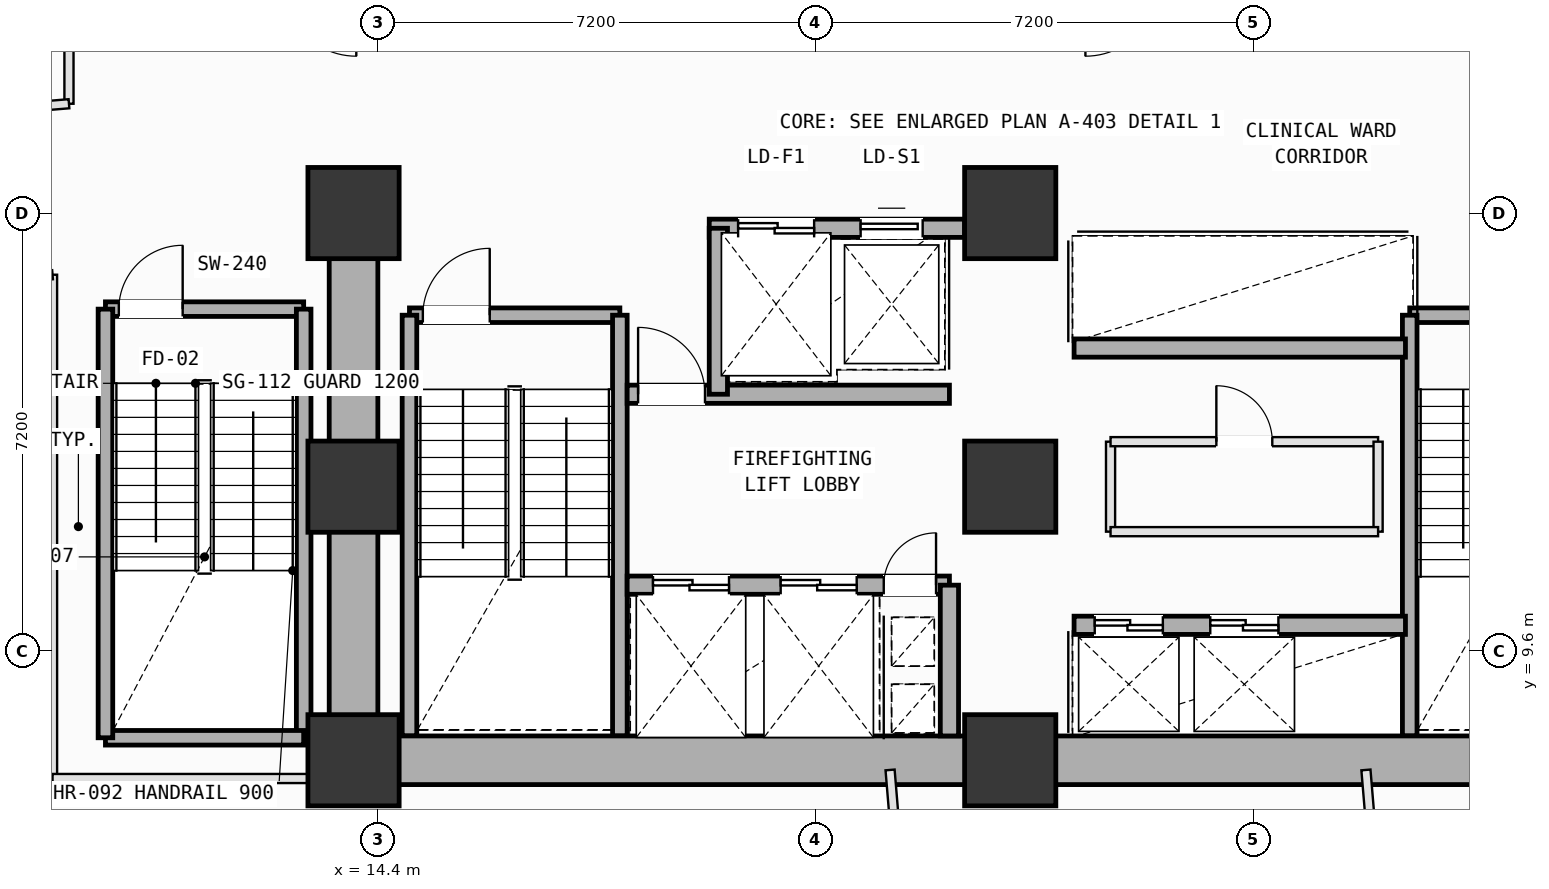
"""IFC4 building model, lengths in metres.
Left out: names, types, materials, properties, quantities, classifications, styles, units other than length and angle.
Written with IfcOpenShell. Run it as: python <this file> out.ifc"""

import sys

from ifc_helpers import new_model, si_unit, direction, frame, frame_2d, origin, origin_2d, place, context, subcontext, project, spatial, rectangle, extrude, element, fill, save


model = new_model("IFC4")
c1 = context("Model", 3, precision=1e-05, world=origin(), true_north=direction((0.0, 1.0)))
c2 = subcontext(c1, "Body", "Model", "MODEL_VIEW")
j1 = project(units=[si_unit("LENGTHUNIT", "METRE"), si_unit("PLANEANGLEUNIT", "RADIAN")], contexts=[c1])
p1 = place(None, origin())
s1 = spatial("IfcSite", under=j1, at=p1, CompositionType="ELEMENT")
p2 = place(p1, origin())
s2 = spatial("IfcBuilding", under=s1, at=p2, CompositionType="ELEMENT")
p3 = place(p2, frame((0.0, 0.0, 43.0)))
s3 = spatial("IfcBuildingStorey", under=s2, at=p3, CompositionType="ELEMENT", Elevation=43.0)
for number, where, z_axis, x_axis in (
    (1, (14.0, 7.8, 0.0), (0.0, 0.0, 1.0), (1.0, 0.0, 0.0)),
    (2, (14.0, 12.3, 0.0), (0.0, 0.0, 1.0), (1.0, 0.0, 0.0)),
    (3, (14.0, 16.8, 0.0), (0.0, 0.0, 1.0), (1.0, 0.0, 0.0)),
    (4, (24.8, 7.8, 0.0), (0.0, 0.0, 1.0), (1.0, 0.0, 0.0)),
    (5, (24.8, 12.3, 0.0), (0.0, 0.0, 1.0), (1.0, 0.0, 0.0)),
    (6, (24.8, 16.8, 0.0), (0.0, 0.0, 1.0), (1.0, 0.0, 0.0)),
):
    element("IfcColumn", number, at=place(p3, frame(where, z_axis=z_axis, x_axis=x_axis)), inside=s3, PredefinedType="COLUMN", context=c2, shape_type="SweptSolid", body=[
        extrude(rectangle(XDim=1.5, YDim=1.5, at=origin_2d()), origin(), (0.0, 0.0, 1.0), 4.0),
    ])
p4 = place(p3, frame((14.92, 15.12, 0.0), z_axis=(0.0, 0.0, 1.0), x_axis=(1.0, 0.0, 0.0)))
e7 = element("IfcWall", 7, at=p4, inside=s3, PredefinedType="SOLIDWALL", context=c2, shape_type="SweptSolid", body=[
    extrude(rectangle(XDim=3.46, YDim=0.24, at=frame_2d((1.73, 0.0))), origin(), (0.0, 0.0, 1.0), 3.78),
])
p5 = place(p4, frame((0.22, 0.0, 0.0)))
e8 = element("IfcOpeningElement", 8, at=p5, cuts=e7, PredefinedType="OPENING", context=c2, shape_type="SweptSolid", body=[
    extrude(rectangle(XDim=1.1, YDim=2.15, at=frame_2d((0.55, 1.075))), frame((0.0, 0.13, 0.0), z_axis=(0.0, -1.0, 0.0), x_axis=(1.0, 0.0, 0.0)), (0.0, 0.0, 1.0), 0.26),
])
for number, where, z_axis, x_axis in (
    (9, (18.38, 15.12, 0.0), (0.0, 0.0, 1.0), (0.0, -1.0, 0.0)),
    (10, (14.92, 8.2, 0.0), (0.0, 0.0, 1.0), (0.0, 1.0, 0.0)),
):
    element("IfcWall", number, at=place(p3, frame(where, z_axis=z_axis, x_axis=x_axis)), inside=s3, PredefinedType="SOLIDWALL", context=c2, shape_type="SweptSolid", body=[
        extrude(rectangle(XDim=6.92, YDim=0.24, at=frame_2d((3.46, 0.0))), origin(), (0.0, 0.0, 1.0), 3.78),
    ])
p6 = place(p3, frame((31.37, 15.12, 0.0), z_axis=(0.0, 0.0, 1.0), x_axis=(1.0, 0.0, 0.0)))
e11 = element("IfcWall", 11, at=p6, inside=s3, PredefinedType="SOLIDWALL", context=c2, shape_type="SweptSolid", body=[
    extrude(rectangle(XDim=3.46, YDim=0.24, at=frame_2d((1.73, 0.0))), origin(), (0.0, 0.0, 1.0), 3.78),
])
p7 = place(p6, frame((2.14, 0.0, 0.0)))
e12 = element("IfcOpeningElement", 12, at=p7, cuts=e11, PredefinedType="OPENING", context=c2, shape_type="SweptSolid", body=[
    extrude(rectangle(XDim=1.1, YDim=2.15, at=frame_2d((0.55, 1.075))), frame((0.0, 0.13, 0.0), z_axis=(0.0, -1.0, 0.0), x_axis=(1.0, 0.0, 0.0)), (0.0, 0.0, 1.0), 0.26),
])
p8 = place(p3, frame((31.37, 8.2, 0.0), z_axis=(0.0, 0.0, 1.0), x_axis=(0.0, 1.0, 0.0)))
e13 = element("IfcWall", 13, at=p8, inside=s3, PredefinedType="SOLIDWALL", context=c2, shape_type="SweptSolid", body=[
    extrude(rectangle(XDim=6.92, YDim=0.24, at=frame_2d((3.46, 0.0))), origin(), (0.0, 0.0, 1.0), 3.78),
])
p9 = place(p3, frame((9.92, 15.22, 0.0), z_axis=(0.0, 0.0, 1.0), x_axis=(1.0, 0.0, 0.0)))
e14 = element("IfcWall", 14, at=p9, inside=s3, PredefinedType="SOLIDWALL", context=c2, shape_type="SweptSolid", body=[
    extrude(rectangle(XDim=3.26, YDim=0.24, at=frame_2d((1.63, 0.0))), origin(), (0.0, 0.0, 1.0), 3.78),
])
p10 = place(p9, frame((0.22, 0.0, 0.0)))
e15 = element("IfcOpeningElement", 15, at=p10, cuts=e14, PredefinedType="OPENING", context=c2, shape_type="SweptSolid", body=[
    extrude(rectangle(XDim=1.05, YDim=2.15, at=frame_2d((0.525, 1.075))), frame((0.0, 0.13, 0.0), z_axis=(0.0, -1.0, 0.0), x_axis=(1.0, 0.0, 0.0)), (0.0, 0.0, 1.0), 0.26),
])
p11 = place(p3, frame((13.18, 15.22, 0.0), z_axis=(0.0, 0.0, 1.0), x_axis=(0.0, -1.0, 0.0)))
e16 = element("IfcWall", 16, at=p11, inside=s3, PredefinedType="SOLIDWALL", context=c2, shape_type="SweptSolid", body=[
    extrude(rectangle(XDim=7.05, YDim=0.24, at=frame_2d((3.525, 0.0))), origin(), (0.0, 0.0, 1.0), 3.78),
])
p12 = place(p3, frame((13.18, 8.17, 0.0), z_axis=(0.0, 0.0, 1.0), x_axis=(-1.0, 0.0, 0.0)))
e17 = element("IfcWall", 17, at=p12, inside=s3, PredefinedType="SOLIDWALL", context=c2, shape_type="SweptSolid", body=[
    extrude(rectangle(XDim=3.26, YDim=0.24, at=frame_2d((1.63, 0.0))), origin(), (0.0, 0.0, 1.0), 3.78),
])
p13 = place(p3, frame((9.92, 8.17, 0.0), z_axis=(0.0, 0.0, 1.0), x_axis=(0.0, 1.0, 0.0)))
e18 = element("IfcWall", 18, at=p13, inside=s3, PredefinedType="SOLIDWALL", context=c2, shape_type="SweptSolid", body=[
    extrude(rectangle(XDim=7.05, YDim=0.24, at=frame_2d((3.525, 0.0))), origin(), (0.0, 0.0, 1.0), 3.78),
])
for number, where, z_axis, x_axis in (
    (19, (14.0, 7.8, 0.0), (0.0, 0.0, 1.0), (1.0, 0.0, 0.0)),
    (20, (24.8, 7.8, 0.0), (0.0, 0.0, 1.0), (1.0, 0.0, 0.0)),
):
    element("IfcWall", number, at=place(p3, frame(where, z_axis=z_axis, x_axis=x_axis)), inside=s3, PredefinedType="SHEAR", context=c2, shape_type="SweptSolid", body=[
        extrude(rectangle(XDim=10.8, YDim=0.8, at=frame_2d((5.4, 0.0))), origin(), (0.0, 0.0, 1.0), 3.78),
    ])
p14 = place(p3, frame((14.0, 16.8, 0.0), z_axis=(0.0, 0.0, 1.0), x_axis=(0.0, -1.0, 0.0)))
e21 = element("IfcWall", 21, at=p14, inside=s3, PredefinedType="SHEAR", context=c2, shape_type="SweptSolid", body=[
    extrude(rectangle(XDim=9.0, YDim=0.8, at=frame_2d((4.5, 0.0))), origin(), (0.0, 0.0, 1.0), 3.78),
])
p15 = place(p3, frame((19.85, 16.55, 0.0), z_axis=(0.0, 0.0, 1.0), x_axis=(1.0, 0.0, 0.0)))
e22 = element("IfcWall", 22, at=p15, inside=s3, PredefinedType="SOLIDWALL", context=c2, shape_type="SweptSolid", body=[
    extrude(rectangle(XDim=4.2, YDim=0.3, at=frame_2d((2.1, 0.0))), origin(), (0.0, 0.0, 1.0), 3.78),
])
p16 = place(p15, frame((0.475, 0.0, 0.0)))
e23 = element("IfcOpeningElement", 23, at=p16, cuts=e22, PredefinedType="OPENING", context=c2, shape_type="SweptSolid", body=[
    extrude(rectangle(XDim=1.25, YDim=2.18, at=frame_2d((0.625, 1.09))), frame((0.0, 0.16, 0.0), z_axis=(0.0, -1.0, 0.0), x_axis=(1.0, 0.0, 0.0)), (0.0, 0.0, 1.0), 0.32),
])
p17 = place(p15, frame((2.49, 0.0, 0.0)))
e24 = element("IfcOpeningElement", 24, at=p17, cuts=e22, PredefinedType="OPENING", context=c2, shape_type="SweptSolid", body=[
    extrude(rectangle(XDim=1.02, YDim=2.12, at=frame_2d((0.51, 1.06))), frame((0.0, 0.16, 0.0), z_axis=(0.0, -1.0, 0.0), x_axis=(1.0, 0.0, 0.0)), (0.0, 0.0, 1.0), 0.32),
])
p18 = place(p3, frame((18.5, 10.68, 0.0), z_axis=(0.0, 0.0, 1.0), x_axis=(1.0, 0.0, 0.0)))
e25 = element("IfcWall", 25, at=p18, inside=s3, PredefinedType="SOLIDWALL", context=c2, shape_type="SweptSolid", body=[
    extrude(rectangle(XDim=5.3, YDim=0.3, at=frame_2d((2.65, 0.0))), origin(), (0.0, 0.0, 1.0), 3.78),
])
p19 = place(p18, frame((4.22, 0.0, 0.0)))
e26 = element("IfcOpeningElement", 26, at=p19, cuts=e25, PredefinedType="OPENING", context=c2, shape_type="SweptSolid", body=[
    extrude(rectangle(XDim=0.86, YDim=2.06, at=frame_2d((0.43, 1.03))), frame((0.0, 0.16, 0.0), z_axis=(0.0, -1.0, 0.0), x_axis=(1.0, 0.0, 0.0)), (0.0, 0.0, 1.0), 0.32),
])
p20 = place(p18, frame((0.425, 0.0, 0.0)))
e27 = element("IfcOpeningElement", 27, at=p20, cuts=e25, PredefinedType="OPENING", context=c2, shape_type="SweptSolid", body=[
    extrude(rectangle(XDim=1.25, YDim=2.18, at=frame_2d((0.625, 1.09))), frame((0.0, 0.16, 0.0), z_axis=(0.0, -1.0, 0.0), x_axis=(1.0, 0.0, 0.0)), (0.0, 0.0, 1.0), 0.32),
])
p21 = place(p18, frame((2.525, 0.0, 0.0)))
e28 = element("IfcOpeningElement", 28, at=p21, cuts=e25, PredefinedType="OPENING", context=c2, shape_type="SweptSolid", body=[
    extrude(rectangle(XDim=1.25, YDim=2.18, at=frame_2d((0.625, 1.09))), frame((0.0, 0.16, 0.0), z_axis=(0.0, -1.0, 0.0), x_axis=(1.0, 0.0, 0.0)), (0.0, 0.0, 1.0), 0.32),
])
p22 = place(p3, frame((18.5, 13.82, 0.0), z_axis=(0.0, 0.0, 1.0), x_axis=(1.0, 0.0, 0.0)))
e29 = element("IfcWall", 29, at=p22, inside=s3, PredefinedType="SOLIDWALL", context=c2, shape_type="SweptSolid", body=[
    extrude(rectangle(XDim=5.3, YDim=0.3, at=frame_2d((2.65, 0.0))), origin(), (0.0, 0.0, 1.0), 3.78),
])
p23 = place(p22, frame((0.18, 0.0, 0.0)))
e30 = element("IfcOpeningElement", 30, at=p23, cuts=e29, PredefinedType="OPENING", context=c2, shape_type="SweptSolid", body=[
    extrude(rectangle(XDim=1.1, YDim=2.15, at=frame_2d((0.55, 1.075))), frame((0.0, 0.16, 0.0), z_axis=(0.0, -1.0, 0.0), x_axis=(1.0, 0.0, 0.0)), (0.0, 0.0, 1.0), 0.32),
])
p24 = place(p3, frame((23.8, 8.2, 0.0), z_axis=(0.0, 0.0, 1.0), x_axis=(0.0, 1.0, 0.0)))
e31 = element("IfcWall", 31, at=p24, inside=s3, PredefinedType="SOLIDWALL", context=c2, shape_type="SweptSolid", body=[
    extrude(rectangle(XDim=2.48, YDim=0.3, at=frame_2d((1.24, 0.0))), origin(), (0.0, 0.0, 1.0), 3.78),
])
p25 = place(p3, frame((20.0, 13.82, 0.0), z_axis=(0.0, 0.0, 1.0), x_axis=(0.0, 1.0, 0.0)))
e32 = element("IfcWall", 32, at=p25, inside=s3, PredefinedType="SOLIDWALL", context=c2, shape_type="SweptSolid", body=[
    extrude(rectangle(XDim=2.73, YDim=0.3, at=frame_2d((1.365, 0.0))), origin(), (0.0, 0.0, 1.0), 3.78),
])
p26 = place(p3, frame((25.85, 10.02, 0.0), z_axis=(0.0, 0.0, 1.0), x_axis=(1.0, 0.0, 0.0)))
e33 = element("IfcWall", 33, at=p26, inside=s3, PredefinedType="SOLIDWALL", context=c2, shape_type="SweptSolid", body=[
    extrude(rectangle(XDim=5.45, YDim=0.3, at=frame_2d((2.725, 0.0))), origin(), (0.0, 0.0, 1.0), 3.78),
])
p27 = place(p26, frame((0.34, 0.0, 0.0)))
e34 = element("IfcOpeningElement", 34, at=p27, cuts=e33, PredefinedType="OPENING", context=c2, shape_type="SweptSolid", body=[
    extrude(rectangle(XDim=1.12, YDim=2.15, at=frame_2d((0.56, 1.075))), frame((0.0, 0.16, 0.0), z_axis=(0.0, -1.0, 0.0), x_axis=(1.0, 0.0, 0.0)), (0.0, 0.0, 1.0), 0.32),
])
p28 = place(p26, frame((2.24, 0.0, 0.0)))
e35 = element("IfcOpeningElement", 35, at=p28, cuts=e33, PredefinedType="OPENING", context=c2, shape_type="SweptSolid", body=[
    extrude(rectangle(XDim=1.12, YDim=2.15, at=frame_2d((0.56, 1.075))), frame((0.0, 0.16, 0.0), z_axis=(0.0, -1.0, 0.0), x_axis=(1.0, 0.0, 0.0)), (0.0, 0.0, 1.0), 0.32),
])
p29 = place(p3, frame((25.85, 14.58, 0.0), z_axis=(0.0, 0.0, 1.0), x_axis=(1.0, 0.0, 0.0)))
e36 = element("IfcWall", 36, at=p29, inside=s3, PredefinedType="SOLIDWALL", context=c2, shape_type="SweptSolid", body=[
    extrude(rectangle(XDim=5.45, YDim=0.3, at=frame_2d((2.725, 0.0))), origin(), (0.0, 0.0, 1.0), 3.78),
])
p30 = place(p3, frame((26.45, 11.56, 0.0), z_axis=(0.0, 0.0, 1.0), x_axis=(0.0, 1.0, 0.0)))
e37 = element("IfcWall", 37, at=p30, inside=s3, PredefinedType="PARTITIONING", context=c2, shape_type="SweptSolid", body=[
    extrude(rectangle(XDim=1.48, YDim=0.15, at=frame_2d((0.74, 0.0))), origin(), (0.0, 0.0, 1.0), 3.78),
])
p31 = place(p3, frame((26.45, 13.04, 0.0), z_axis=(0.0, 0.0, 1.0), x_axis=(1.0, 0.0, 0.0)))
e38 = element("IfcWall", 38, at=p31, inside=s3, PredefinedType="PARTITIONING", context=c2, shape_type="SweptSolid", body=[
    extrude(rectangle(XDim=4.4, YDim=0.15, at=frame_2d((2.2, 0.0))), origin(), (0.0, 0.0, 1.0), 3.78),
])
p32 = place(p31, frame((1.74, 0.0, 0.0)))
e39 = element("IfcOpeningElement", 39, at=p32, cuts=e38, PredefinedType="OPENING", context=c2, shape_type="SweptSolid", body=[
    extrude(rectangle(XDim=0.92, YDim=2.1, at=frame_2d((0.46, 1.05))), frame((0.0, 0.085, 0.0), z_axis=(0.0, -1.0, 0.0), x_axis=(1.0, 0.0, 0.0)), (0.0, 0.0, 1.0), 0.17),
])
p33 = place(p3, frame((30.85, 13.04, 0.0), z_axis=(0.0, 0.0, 1.0), x_axis=(0.0, -1.0, 0.0)))
e40 = element("IfcWall", 40, at=p33, inside=s3, PredefinedType="PARTITIONING", context=c2, shape_type="SweptSolid", body=[
    extrude(rectangle(XDim=1.48, YDim=0.15, at=frame_2d((0.74, 0.0))), origin(), (0.0, 0.0, 1.0), 3.78),
])
p34 = place(p3, frame((30.85, 11.56, 0.0), z_axis=(0.0, 0.0, 1.0), x_axis=(-1.0, 0.0, 0.0)))
e41 = element("IfcWall", 41, at=p34, inside=s3, PredefinedType="PARTITIONING", context=c2, shape_type="SweptSolid", body=[
    extrude(rectangle(XDim=4.4, YDim=0.15, at=frame_2d((2.2, 0.0))), origin(), (0.0, 0.0, 1.0), 3.78),
])
p35 = place(p3, frame((9.05, 15.786, 0.0), z_axis=(0.0, 0.0, 1.0), x_axis=(0.0, -1.0, 0.0)))
e42 = element("IfcWall", 42, at=p35, inside=s3, PredefinedType="PARTITIONING", context=c2, shape_type="SweptSolid", body=[
    extrude(rectangle(XDim=8.286, YDim=0.15, at=frame_2d((4.143, 0.0))), origin(), (0.0, 0.0, 1.0), 3.78),
])
p36 = place(p3, frame((9.05, 7.5, 0.0), z_axis=(0.0, 0.0, 1.0), x_axis=(1.0, 0.0, 0.0)))
e43 = element("IfcWall", 43, at=p36, inside=s3, PredefinedType="PARTITIONING", context=c2, shape_type="SweptSolid", body=[
    extrude(rectangle(XDim=4.95, YDim=0.15, at=frame_2d((2.475, 0.0))), origin(), (0.0, 0.0, 1.0), 3.78),
])
p37 = place(p3, frame((6.67, 15.588, 0.0), z_axis=(0.0, 0.0, 1.0), x_axis=(0.996557732461, 0.082901663866, 0.0)))
e44 = element("IfcWall", 44, at=p37, inside=s3, PredefinedType="PARTITIONING", context=c2, shape_type="SweptSolid", body=[
    extrude(rectangle(XDim=2.388, YDim=0.15, at=frame_2d((1.194, 0.0))), origin(), (0.0, 0.0, 1.0), 2.865),
])
p38 = place(p3, frame((22.824, 7.641, 0.0), z_axis=(0.0, 0.0, 1.0), x_axis=(0.082778701645, -0.996567953806, 0.0)))
e45 = element("IfcWall", 45, at=p38, inside=s3, PredefinedType="PARTITIONING", context=c2, shape_type="SweptSolid", body=[
    extrude(rectangle(XDim=5.907, YDim=0.15, at=frame_2d((2.954, 0.0))), origin(), (0.0, 0.0, 1.0), 3.78),
])
p39 = place(p38, frame((2.674, 0.0, 0.0)))
e46 = element("IfcOpeningElement", 46, at=p39, cuts=e45, PredefinedType="OPENING", context=c2, shape_type="SweptSolid", body=[
    extrude(rectangle(XDim=0.86, YDim=2.06, at=frame_2d((0.43, 1.03))), frame((0.0, 0.085, 0.0), z_axis=(0.0, -1.0, 0.0), x_axis=(1.0, 0.0, 0.0)), (0.0, 0.0, 1.0), 0.17),
])
p40 = place(p3, frame((30.65, 7.641, 0.0), z_axis=(0.0, 0.0, 1.0), x_axis=(0.083091579505, -0.996541915534, 0.0)))
e47 = element("IfcWall", 47, at=p40, inside=s3, PredefinedType="PARTITIONING", context=c2, shape_type="SweptSolid", body=[
    extrude(rectangle(XDim=5.259, YDim=0.15, at=frame_2d((2.63, 0.0))), origin(), (0.0, 0.0, 1.0), 3.78),
])
p41 = place(p40, frame((2.35, 0.0, 0.0)))
e48 = element("IfcOpeningElement", 48, at=p41, cuts=e47, PredefinedType="OPENING", context=c2, shape_type="SweptSolid", body=[
    extrude(rectangle(XDim=0.86, YDim=2.06, at=frame_2d((0.43, 1.03))), frame((0.0, 0.085, 0.0), z_axis=(0.0, -1.0, 0.0), x_axis=(1.0, 0.0, 0.0)), (0.0, 0.0, 1.0), 0.17),
])
p42 = place(p3, frame((9.32, 20.55, 0.0), z_axis=(0.0, 0.0, 1.0), x_axis=(0.0, -1.0, 0.0)))
e49 = element("IfcWall", 49, at=p42, inside=s3, PredefinedType="PARTITIONING", context=c2, shape_type="SweptSolid", body=[
    extrude(rectangle(XDim=1.952, YDim=0.15, at=frame_2d((0.976, 0.0))), origin(), (0.0, 0.0, 1.0), 3.78),
])
p43 = place(p3, frame((9.32, 18.598, 0.0), z_axis=(0.0, 0.0, 1.0), x_axis=(-0.99659655083, -0.082433699866, 0.0)))
e50 = element("IfcWall", 50, at=p43, inside=s3, PredefinedType="PARTITIONING", context=c2, shape_type="SweptSolid", body=[
    extrude(rectangle(XDim=1.09, YDim=0.15, at=frame_2d((0.545, 0.0))), origin(), (0.0, 0.0, 1.0), 3.78),
])
p44 = place(p5, origin())
e51 = element("IfcDoor", 51, at=p44, inside=s3, OperationType="SINGLE_SWING_RIGHT", PredefinedType="DOOR", context=c2, shape_type="SweptSolid", body=[
    extrude(rectangle(XDim=1.1, YDim=2.15, at=frame_2d((0.55, 1.075))), frame((0.0, 0.025, 0.0), z_axis=(0.0, -1.0, 0.0), x_axis=(1.0, 0.0, 0.0)), (0.0, 0.0, 1.0), 0.05),
])
fill(e8, e51)
p45 = place(p10, origin())
e52 = element("IfcDoor", 52, at=p45, inside=s3, OperationType="SINGLE_SWING_RIGHT", PredefinedType="DOOR", context=c2, shape_type="SweptSolid", body=[
    extrude(rectangle(XDim=1.05, YDim=2.15, at=frame_2d((0.525, 1.075))), frame((0.0, 0.025, 0.0), z_axis=(0.0, -1.0, 0.0), x_axis=(1.0, 0.0, 0.0)), (0.0, 0.0, 1.0), 0.05),
])
fill(e15, e52)
p46 = place(p19, origin())
e53 = element("IfcDoor", 53, at=p46, inside=s3, OperationType="SINGLE_SWING_RIGHT", PredefinedType="DOOR", context=c2, shape_type="SweptSolid", body=[
    extrude(rectangle(XDim=0.86, YDim=2.06, at=frame_2d((0.43, 1.03))), frame((0.0, 0.025, 0.0), z_axis=(0.0, -1.0, 0.0), x_axis=(1.0, 0.0, 0.0)), (0.0, 0.0, 1.0), 0.05),
])
fill(e26, e53)
p47 = place(p23, origin())
e54 = element("IfcDoor", 54, at=p47, inside=s3, OperationType="SINGLE_SWING_LEFT", PredefinedType="DOOR", context=c2, shape_type="SweptSolid", body=[
    extrude(rectangle(XDim=1.1, YDim=2.15, at=frame_2d((0.55, 1.075))), frame((0.0, 0.025, 0.0), z_axis=(0.0, -1.0, 0.0), x_axis=(1.0, 0.0, 0.0)), (0.0, 0.0, 1.0), 0.05),
])
fill(e30, e54)
p48 = place(p20, origin())
e55 = element("IfcDoor", 55, at=p48, inside=s3, OperationType="DOUBLE_DOOR_SLIDING", PredefinedType="DOOR", context=c2, shape_type="SweptSolid", body=[
    extrude(rectangle(XDim=1.25, YDim=2.18, at=frame_2d((0.625, 1.09))), frame((0.0, 0.025, 0.0), z_axis=(0.0, -1.0, 0.0), x_axis=(1.0, 0.0, 0.0)), (0.0, 0.0, 1.0), 0.05),
])
fill(e27, e55)
p49 = place(p21, origin())
e56 = element("IfcDoor", 56, at=p49, inside=s3, OperationType="DOUBLE_DOOR_SLIDING", PredefinedType="DOOR", context=c2, shape_type="SweptSolid", body=[
    extrude(rectangle(XDim=1.25, YDim=2.18, at=frame_2d((0.625, 1.09))), frame((0.0, 0.025, 0.0), z_axis=(0.0, -1.0, 0.0), x_axis=(1.0, 0.0, 0.0)), (0.0, 0.0, 1.0), 0.05),
])
fill(e28, e56)
p50 = place(p27, origin())
e57 = element("IfcDoor", 57, at=p50, inside=s3, OperationType="DOUBLE_DOOR_SLIDING", PredefinedType="DOOR", context=c2, shape_type="SweptSolid", body=[
    extrude(rectangle(XDim=1.12, YDim=2.15, at=frame_2d((0.56, 1.075))), frame((0.0, 0.025, 0.0), z_axis=(0.0, -1.0, 0.0), x_axis=(1.0, 0.0, 0.0)), (0.0, 0.0, 1.0), 0.05),
])
fill(e34, e57)
p51 = place(p28, origin())
e58 = element("IfcDoor", 58, at=p51, inside=s3, OperationType="DOUBLE_DOOR_SLIDING", PredefinedType="DOOR", context=c2, shape_type="SweptSolid", body=[
    extrude(rectangle(XDim=1.12, YDim=2.15, at=frame_2d((0.56, 1.075))), frame((0.0, 0.025, 0.0), z_axis=(0.0, -1.0, 0.0), x_axis=(1.0, 0.0, 0.0)), (0.0, 0.0, 1.0), 0.05),
])
fill(e35, e58)
p52 = place(p16, origin())
e59 = element("IfcDoor", 59, at=p52, inside=s3, OperationType="DOUBLE_DOOR_SLIDING", PredefinedType="DOOR", context=c2, shape_type="SweptSolid", body=[
    extrude(rectangle(XDim=1.25, YDim=2.18, at=frame_2d((0.625, 1.09))), frame((0.0, 0.025, 0.0), z_axis=(0.0, -1.0, 0.0), x_axis=(1.0, 0.0, 0.0)), (0.0, 0.0, 1.0), 0.05),
])
fill(e23, e59)
p53 = place(p17, origin())
e60 = element("IfcDoor", 60, at=p53, inside=s3, OperationType="SLIDING_TO_LEFT", PredefinedType="DOOR", context=c2, shape_type="SweptSolid", body=[
    extrude(rectangle(XDim=1.02, YDim=2.12, at=frame_2d((0.51, 1.06))), frame((0.0, 0.025, 0.0), z_axis=(0.0, -1.0, 0.0), x_axis=(1.0, 0.0, 0.0)), (0.0, 0.0, 1.0), 0.05),
])
fill(e24, e60)
p54 = place(p32, origin())
e61 = element("IfcDoor", 61, at=p54, inside=s3, OperationType="SINGLE_SWING_LEFT", PredefinedType="DOOR", context=c2, shape_type="SweptSolid", body=[
    extrude(rectangle(XDim=0.92, YDim=2.1, at=frame_2d((0.46, 1.05))), frame((0.0, 0.025, 0.0), z_axis=(0.0, -1.0, 0.0), x_axis=(1.0, 0.0, 0.0)), (0.0, 0.0, 1.0), 0.05),
])
fill(e39, e61)
save(model, sys.argv[1])
